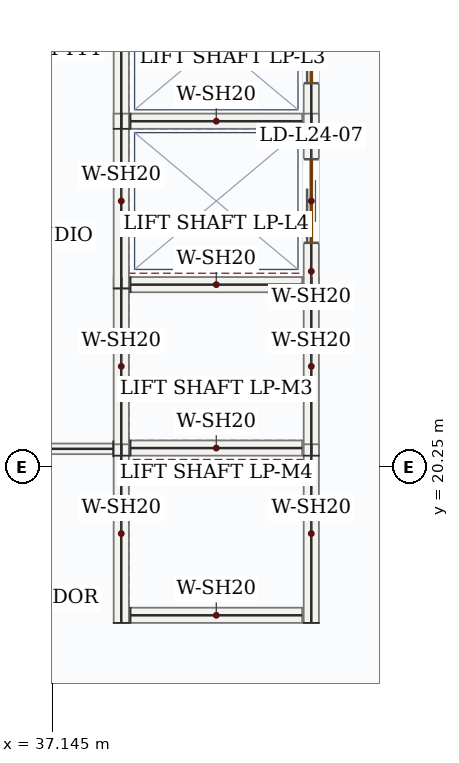
"""IFC4 building model, lengths in metres.
Left out: names, types, materials, properties, quantities, classifications, styles, units other than length and angle.
Written with IfcOpenShell. Run it as: python <this file> out.ifc"""

import sys

from ifc_helpers import new_model, si_unit, direction, frame, frame_2d, origin, place, context, subcontext, project, spatial, rectangle, extrude, source, transform, mapped, element, fill, save


model = new_model("IFC4")
c1 = context("Model", 3, precision=1e-05, world=origin(), true_north=direction((0.0, 1.0)))
c2 = subcontext(c1, "Body", "Model", "MODEL_VIEW")
j1 = project(units=[si_unit("LENGTHUNIT", "METRE"), si_unit("PLANEANGLEUNIT", "RADIAN")], contexts=[c1])
p1 = place(None, origin())
s1 = spatial("IfcSite", under=j1, at=p1, CompositionType="ELEMENT")
p2 = place(p1, origin())
s2 = spatial("IfcBuilding", under=s1, at=p2, CompositionType="ELEMENT")
p3 = place(p2, frame((0.0, 0.0, 108.9)))
s3 = spatial("IfcBuildingStorey", under=s2, at=p3, CompositionType="ELEMENT", Elevation=108.9)
m1 = source(origin(), c2, "Body", "SweptSolid", [
    extrude(rectangle(XDim=2.35, YDim=0.2, at=frame_2d((1.175, 0.0))), origin(), (0.0, 0.0, 1.0), 3.95),
])
for number, where, z_axis, x_axis in (
    (1, (38.05, 20.4, 0.0), (0.0, 0.0, 1.0), (0.0, 1.0, 0.0)),
    (2, (40.55, 20.4, 0.0), (0.0, 0.0, 1.0), (0.0, 1.0, 0.0)),
):
    element("IfcWall", number, at=place(p3, frame(where, z_axis=z_axis, x_axis=x_axis)), inside=s3, PredefinedType="SOLIDWALL", context=c2, shape_type="MappedRepresentation", body=[
        mapped(m1, transform((0.0, 0.0, 0.0), x_axis=(1.0, 0.0, 0.0), y_axis=(0.0, 1.0, 0.0), z_axis=(0.0, 0.0, 1.0), scale=1.0)),
    ])
m2 = source(origin(), c2, "Body", "SweptSolid", [
    extrude(rectangle(XDim=2.26, YDim=0.2, at=frame_2d((1.13, 0.0))), origin(), (0.0, 0.0, 1.0), 3.95),
])
for number, where, z_axis, x_axis in (
    (3, (38.17, 20.5, 0.0), (0.0, 0.0, 1.0), (1.0, 0.0, 0.0)),
    (4, (38.17, 22.65, 0.0), (0.0, 0.0, 1.0), (1.0, 0.0, 0.0)),
):
    element("IfcWall", number, at=place(p3, frame(where, z_axis=z_axis, x_axis=x_axis)), inside=s3, PredefinedType="SOLIDWALL", context=c2, shape_type="MappedRepresentation", body=[
        mapped(m2, transform((0.0, 0.0, 0.0), x_axis=(1.0, 0.0, 0.0), y_axis=(0.0, 1.0, 0.0), z_axis=(0.0, 0.0, 1.0), scale=1.0)),
    ])
for number, where, z_axis, x_axis in (
    (5, (38.05, 18.2, 0.0), (0.0, 0.0, 1.0), (0.0, 1.0, 0.0)),
    (6, (40.55, 18.2, 0.0), (0.0, 0.0, 1.0), (0.0, 1.0, 0.0)),
):
    element("IfcWall", number, at=place(p3, frame(where, z_axis=z_axis, x_axis=x_axis)), inside=s3, PredefinedType="SOLIDWALL", context=c2, shape_type="MappedRepresentation", body=[
        mapped(m1, transform((0.0, 0.0, 0.0), x_axis=(1.0, 0.0, 0.0), y_axis=(0.0, 1.0, 0.0), z_axis=(0.0, 0.0, 1.0), scale=1.0)),
    ])
p4 = place(p3, frame((38.17, 18.3, 0.0), z_axis=(0.0, 0.0, 1.0), x_axis=(1.0, 0.0, 0.0)))
e7 = element("IfcWall", 7, at=p4, inside=s3, PredefinedType="SOLIDWALL", context=c2, shape_type="MappedRepresentation", body=[
    mapped(m2, transform((0.0, 0.0, 0.0), x_axis=(1.0, 0.0, 0.0), y_axis=(0.0, 1.0, 0.0), z_axis=(0.0, 0.0, 1.0), scale=1.0)),
])
m3 = source(origin(), c2, "Body", "SweptSolid", [
    extrude(rectangle(XDim=2.3, YDim=0.2, at=frame_2d((1.15, 0.0))), origin(), (0.0, 0.0, 1.0), 3.95),
])
p5 = place(p3, frame((38.05, 24.7, 0.0), z_axis=(0.0, 0.0, 1.0), x_axis=(0.0, 1.0, 0.0)))
e8 = element("IfcWall", 8, at=p5, inside=s3, PredefinedType="SOLIDWALL", context=c2, shape_type="MappedRepresentation", body=[
    mapped(m3, transform((0.0, 0.0, 0.0), x_axis=(1.0, 0.0, 0.0), y_axis=(0.0, 1.0, 0.0), z_axis=(0.0, 0.0, 1.0), scale=1.0)),
])
p6 = place(p3, frame((40.55, 24.7, 0.0), z_axis=(0.0, 0.0, 1.0), x_axis=(0.0, 1.0, 0.0)))
e9 = element("IfcWall", 9, at=p6, inside=s3, PredefinedType="SOLIDWALL", context=c2, shape_type="SweptSolid", body=[
    extrude(rectangle(XDim=2.3, YDim=0.2, at=frame_2d((1.15, 0.0))), origin(), (0.0, 0.0, 1.0), 3.95),
])
p7 = place(p6, frame((0.6, 0.0, 0.0)))
e10 = element("IfcOpeningElement", 10, at=p7, cuts=e9, PredefinedType="OPENING", context=c2, shape_type="SweptSolid", body=[
    extrude(rectangle(XDim=1.1, YDim=2.15, at=frame_2d((0.55, 1.075))), frame((0.0, 0.11, 0.0), z_axis=(0.0, -1.0, 0.0), x_axis=(1.0, 0.0, 0.0)), (0.0, 0.0, 1.0), 0.22),
])
p8 = place(p3, frame((38.17, 24.8, 0.0), z_axis=(0.0, 0.0, 1.0), x_axis=(1.0, 0.0, 0.0)))
e11 = element("IfcWall", 11, at=p8, inside=s3, PredefinedType="SOLIDWALL", context=c2, shape_type="MappedRepresentation", body=[
    mapped(m2, transform((0.0, 0.0, 0.0), x_axis=(1.0, 0.0, 0.0), y_axis=(0.0, 1.0, 0.0), z_axis=(0.0, 0.0, 1.0), scale=1.0)),
])
m4 = source(origin(), c2, "Body", "SweptSolid", [
    extrude(rectangle(XDim=2.3, YDim=0.2, at=frame_2d((1.15, 0.0))), origin(), (0.0, 0.0, 1.0), 3.95),
])
p9 = place(p3, frame((38.05, 22.6, 0.0), z_axis=(0.0, 0.0, 1.0), x_axis=(0.0, 1.0, 0.0)))
e12 = element("IfcWall", 12, at=p9, inside=s3, PredefinedType="SOLIDWALL", context=c2, shape_type="MappedRepresentation", body=[
    mapped(m4, transform((0.0, 0.0, 0.0), x_axis=(1.0, 0.0, 0.0), y_axis=(0.0, 1.0, 0.0), z_axis=(0.0, 0.0, 1.0), scale=1.0)),
])
p10 = place(p3, frame((40.55, 22.6, 0.0), z_axis=(0.0, 0.0, 1.0), x_axis=(0.0, 1.0, 0.0)))
e13 = element("IfcWall", 13, at=p10, inside=s3, PredefinedType="SOLIDWALL", context=c2, shape_type="SweptSolid", body=[
    extrude(rectangle(XDim=2.3, YDim=0.2, at=frame_2d((1.15, 0.0))), origin(), (0.0, 0.0, 1.0), 3.95),
])
p11 = place(p10, frame((0.6, 0.0, 0.0)))
e14 = element("IfcOpeningElement", 14, at=p11, cuts=e13, PredefinedType="OPENING", context=c2, shape_type="SweptSolid", body=[
    extrude(rectangle(XDim=1.1, YDim=2.15, at=frame_2d((0.55, 1.075))), frame((0.0, 0.11, 0.0), z_axis=(0.0, -1.0, 0.0), x_axis=(1.0, 0.0, 0.0)), (0.0, 0.0, 1.0), 0.22),
])
m5 = source(origin(), c2, "Body", "SweptSolid", [
    extrude(rectangle(XDim=3.89, YDim=0.14, at=frame_2d((1.945, 0.0))), origin(), (0.0, 0.0, 1.0), 3.95),
])
p12 = place(p3, frame((37.945, 20.49, 0.0), z_axis=(0.0, 0.0, 1.0), x_axis=(-1.0, 0.0, 0.0)))
e15 = element("IfcWall", 15, at=p12, inside=s3, PredefinedType="PARTITIONING", context=c2, shape_type="MappedRepresentation", body=[
    mapped(m5, transform((0.0, 0.0, 0.0), x_axis=(1.0, 0.0, 0.0), y_axis=(0.0, 1.0, 0.0), z_axis=(0.0, 0.0, 1.0), scale=1.0)),
])
m6 = source(origin(), c2, "Body", "SweptSolid", [
    extrude(rectangle(XDim=1.1, YDim=2.15, at=frame_2d((0.55, 1.075))), frame((0.0, 0.025, 0.0), z_axis=(0.0, -1.0, 0.0), x_axis=(1.0, 0.0, 0.0)), (0.0, 0.0, 1.0), 0.05),
])
p13 = place(p7, origin())
e16 = element("IfcDoor", 16, at=p13, inside=s3, OperationType="DOUBLE_DOOR_SLIDING", PredefinedType="DOOR", context=c2, shape_type="MappedRepresentation", body=[
    mapped(m6, transform((0.0, 0.0, 0.0), x_axis=(1.0, 0.0, 0.0), y_axis=(0.0, 1.0, 0.0), z_axis=(0.0, 0.0, 1.0), scale=1.0)),
])
fill(e10, e16)
p14 = place(p11, origin())
e17 = element("IfcDoor", 17, at=p14, inside=s3, OperationType="DOUBLE_DOOR_SLIDING", PredefinedType="DOOR", context=c2, shape_type="MappedRepresentation", body=[
    mapped(m6, transform((0.0, 0.0, 0.0), x_axis=(1.0, 0.0, 0.0), y_axis=(0.0, 1.0, 0.0), z_axis=(0.0, 0.0, 1.0), scale=1.0)),
])
fill(e14, e17)
save(model, sys.argv[1])
